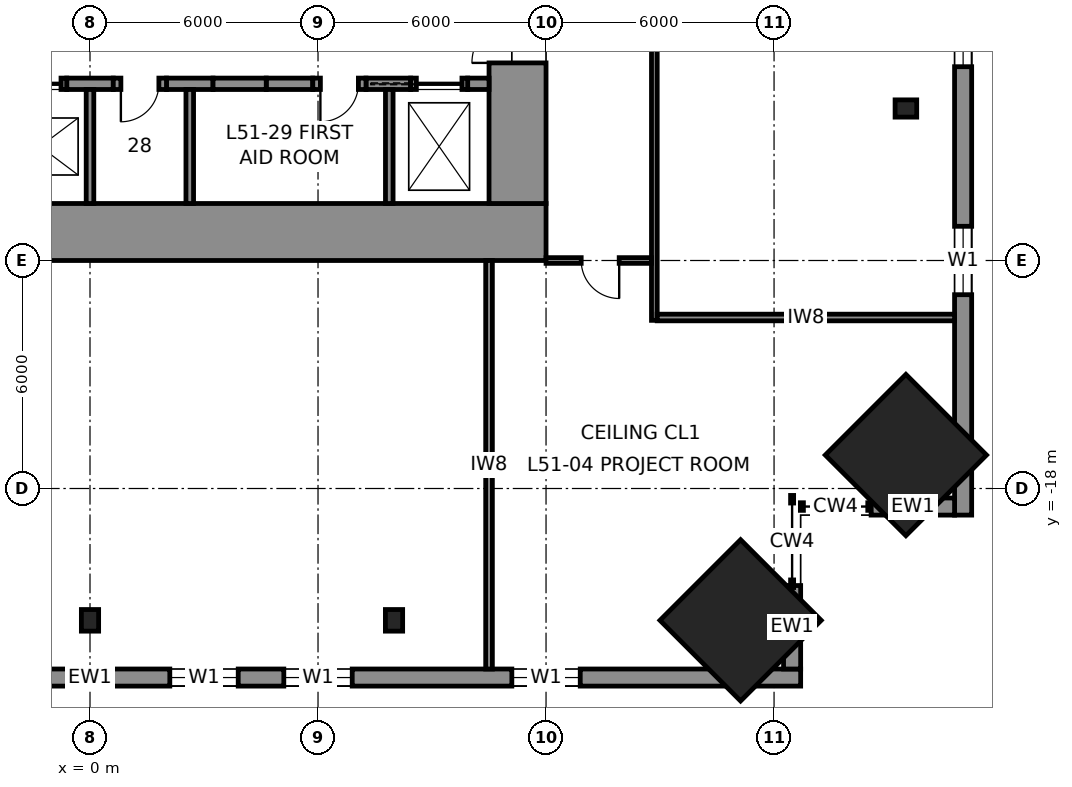
"""IFC4 building model, lengths in metres.
Left out: names, types, materials, properties, quantities, classifications, styles, units other than length and angle.
Written with IfcOpenShell. Run it as: python <this file> out.ifc"""

import sys

from ifc_helpers import new_model, si_unit, direction, frame, frame_2d, origin, origin_2d, place, context, subcontext, project, spatial, rectangle, i_section, extrude, element, fill, save


model = new_model("IFC4")
c1 = context("Model", 3, precision=1e-05, world=origin(), true_north=direction((0.0, 1.0)))
c2 = subcontext(c1, "Body", "Model", "MODEL_VIEW")
j1 = project(units=[si_unit("LENGTHUNIT", "METRE"), si_unit("PLANEANGLEUNIT", "RADIAN")], contexts=[c1])
p1 = place(None, origin())
s1 = spatial("IfcSite", under=j1, at=p1, CompositionType="ELEMENT")
p2 = place(p1, origin())
s2 = spatial("IfcBuilding", under=s1, at=p2, CompositionType="ELEMENT")
p3 = place(p2, frame((0.0, 0.0, 233.8)))
s3 = spatial("IfcBuildingStorey", under=s2, at=p3, CompositionType="ELEMENT", Elevation=233.8)
for number, where, z_axis, x_axis in (
    (1, (21.469, -17.119, 0.0), (-0.04, 0.04, 0.998), (-0.708, -0.707, 0.0)),
    (2, (17.119, -21.469, 0.0), (-0.04, 0.04, 0.998), (-0.707, -0.708, 0.0)),
):
    element("IfcColumn", number, at=place(p3, frame(where, z_axis=z_axis, x_axis=x_axis)), inside=s3, PredefinedType="COLUMN", context=c2, shape_type="SweptSolid", body=[
        extrude(rectangle(XDim=3.0, YDim=3.0, at=origin_2d()), origin(), (0.0, 0.0, 1.0), 4.007),
    ])
for number, where, z_axis, x_axis in (
    (3, (21.469, -8.0, 0.0), (-0.04, 0.0, 0.999), (0.0, -1.0, 0.0)),
    (4, (0.0, -21.469, 0.0), (0.0, 0.04, 0.999), (-1.0, 0.0, 0.0)),
    (5, (8.0, -21.469, 0.0), (0.0, 0.04, 0.999), (-1.0, 0.0, 0.0)),
):
    element("IfcColumn", number, at=place(p3, frame(where, z_axis=z_axis, x_axis=x_axis)), inside=s3, PredefinedType="COLUMN", context=c2, shape_type="SweptSolid", body=[
        extrude(i_section(OverallWidth=0.454, OverallDepth=0.569, WebThickness=0.078, FlangeThickness=0.125, at=origin_2d()), origin(), (0.0, 0.0, 1.0), 4.003),
    ])
p4 = place(p3, frame((12.0, -11.25, 0.0), z_axis=(0.0, 0.0, 1.0), x_axis=(-1.0, 0.0, 0.0)))
e6 = element("IfcWall", 6, at=p4, inside=s3, PredefinedType="SHEAR", context=c2, shape_type="SweptSolid", body=[
    extrude(rectangle(XDim=24.0, YDim=1.5, at=frame_2d((12.0, 0.0))), origin(), (0.0, 0.0, 1.0), 4.0),
])
p5 = place(p3, frame((11.25, 10.5, 0.0), z_axis=(0.0, 0.0, 1.0), x_axis=(0.0, -1.0, 0.0)))
e7 = element("IfcWall", 7, at=p5, inside=s3, PredefinedType="SHEAR", context=c2, shape_type="SweptSolid", body=[
    extrude(rectangle(XDim=21.0, YDim=1.5, at=frame_2d((10.5, 0.0))), origin(), (0.0, 0.0, 1.0), 4.0),
])
p6 = place(p5, frame((3.7, 0.0, 0.0)))
e8 = element("IfcOpeningElement", 8, at=p6, cuts=e7, PredefinedType="OPENING", context=c2, shape_type="SweptSolid", body=[
    extrude(rectangle(XDim=1.2, YDim=2.3, at=frame_2d((0.6, 1.15))), frame((0.0, 0.76, 0.0), z_axis=(0.0, -1.0, 0.0), x_axis=(1.0, 0.0, 0.0)), (0.0, 0.0, 1.0), 1.52),
])
p7 = place(p5, frame((16.1, 0.0, 0.0)))
e9 = element("IfcOpeningElement", 9, at=p7, cuts=e7, PredefinedType="OPENING", context=c2, shape_type="SweptSolid", body=[
    extrude(rectangle(XDim=1.2, YDim=2.3, at=frame_2d((0.6, 1.15))), frame((0.0, 0.76, 0.0), z_axis=(0.0, -1.0, 0.0), x_axis=(1.0, 0.0, 0.0)), (0.0, 0.0, 1.0), 1.52),
])
for number, where, z_axis, x_axis in (
    (10, (-0.613, -7.35, 0.0), (0.0, 0.0, 1.0), (1.0, 0.0, 0.0)),
    (11, (2.012, -7.35, 0.0), (0.0, 0.0, 1.0), (1.0, 0.0, 0.0)),
    (12, (4.637, -7.35, 0.0), (0.0, 0.0, 1.0), (1.0, 0.0, 0.0)),
):
    element("IfcWall", number, at=place(p3, frame(where, z_axis=z_axis, x_axis=x_axis)), inside=s3, PredefinedType="SHEAR", context=c2, shape_type="SweptSolid", body=[
        extrude(rectangle(XDim=1.225, YDim=0.3, at=frame_2d((0.613, 0.0))), origin(), (0.0, 0.0, 1.0), 4.0),
    ])
p8 = place(p3, frame((7.262, -7.35, 0.0), z_axis=(0.0, 0.0, 1.0), x_axis=(1.0, 0.0, 0.0)))
e13 = element("IfcWall", 13, at=p8, inside=s3, PredefinedType="SHEAR", context=c2, shape_type="SweptSolid", body=[
    extrude(rectangle(XDim=1.175, YDim=0.3, at=frame_2d((0.587, 0.0))), origin(), (0.0, 0.0, 1.0), 4.0),
])
p9 = place(p3, frame((9.938, -7.35, 0.0), z_axis=(0.0, 0.0, 1.0), x_axis=(1.0, 0.0, 0.0)))
e14 = element("IfcWall", 14, at=p9, inside=s3, PredefinedType="SHEAR", context=c2, shape_type="SweptSolid", body=[
    extrude(rectangle(XDim=0.562, YDim=0.3, at=frame_2d((0.281, 0.0))), origin(), (0.0, 0.0, 1.0), 4.0),
])
p10 = place(p3, frame((-2.012, -7.35, 0.0), z_axis=(0.0, 0.0, 1.0), x_axis=(1.0, 0.0, 0.0)))
e15 = element("IfcWall", 15, at=p10, inside=s3, PredefinedType="PARTITIONING", context=c2, shape_type="SweptSolid", body=[
    extrude(rectangle(XDim=1.4, YDim=0.3, at=frame_2d((0.7, 0.0))), origin(), (0.0, 0.0, 1.0), 4.0),
])
p11 = place(p10, frame((0.15, 0.0, 0.0)))
e16 = element("IfcOpeningElement", 16, at=p11, cuts=e15, PredefinedType="OPENING", context=c2, shape_type="SweptSolid", body=[
    extrude(rectangle(XDim=1.1, YDim=2.3, at=frame_2d((0.55, 1.15))), frame((0.0, 0.16, 0.0), z_axis=(0.0, -1.0, 0.0), x_axis=(1.0, 0.0, 0.0)), (0.0, 0.0, 1.0), 0.32),
])
p12 = place(p3, frame((0.613, -7.35, 0.0), z_axis=(0.0, 0.0, 1.0), x_axis=(1.0, 0.0, 0.0)))
e17 = element("IfcWall", 17, at=p12, inside=s3, PredefinedType="PARTITIONING", context=c2, shape_type="SweptSolid", body=[
    extrude(rectangle(XDim=1.4, YDim=0.3, at=frame_2d((0.7, 0.0))), origin(), (0.0, 0.0, 1.0), 4.0),
])
p13 = place(p12, frame((0.2, 0.0, 0.0)))
e18 = element("IfcOpeningElement", 18, at=p13, cuts=e17, PredefinedType="OPENING", context=c2, shape_type="SweptSolid", body=[
    extrude(rectangle(XDim=1.0, YDim=2.3, at=frame_2d((0.5, 1.15))), frame((0.0, 0.16, 0.0), z_axis=(0.0, -1.0, 0.0), x_axis=(1.0, 0.0, 0.0)), (0.0, 0.0, 1.0), 0.32),
])
p14 = place(p3, frame((3.238, -7.35, 0.0), z_axis=(0.0, 0.0, 1.0), x_axis=(1.0, 0.0, 0.0)))
e19 = element("IfcWall", 19, at=p14, inside=s3, PredefinedType="PARTITIONING", context=c2, shape_type="SweptSolid", body=[
    extrude(rectangle(XDim=1.4, YDim=0.3, at=frame_2d((0.7, 0.0))), origin(), (0.0, 0.0, 1.0), 4.0),
])
p15 = place(p3, frame((5.863, -7.35, 0.0), z_axis=(0.0, 0.0, 1.0), x_axis=(1.0, 0.0, 0.0)))
e20 = element("IfcWall", 20, at=p15, inside=s3, PredefinedType="PARTITIONING", context=c2, shape_type="SweptSolid", body=[
    extrude(rectangle(XDim=1.4, YDim=0.3, at=frame_2d((0.7, 0.0))), origin(), (0.0, 0.0, 1.0), 4.0),
])
p16 = place(p15, frame((0.2, 0.0, 0.0)))
e21 = element("IfcOpeningElement", 21, at=p16, cuts=e20, PredefinedType="OPENING", context=c2, shape_type="SweptSolid", body=[
    extrude(rectangle(XDim=1.0, YDim=2.3, at=frame_2d((0.5, 1.15))), frame((0.0, 0.16, 0.0), z_axis=(0.0, -1.0, 0.0), x_axis=(1.0, 0.0, 0.0)), (0.0, 0.0, 1.0), 0.32),
])
p17 = place(p3, frame((8.438, -7.35, 0.0), z_axis=(0.0, 0.0, 1.0), x_axis=(1.0, 0.0, 0.0)))
e22 = element("IfcWall", 22, at=p17, inside=s3, PredefinedType="PARTITIONING", context=c2, shape_type="SweptSolid", body=[
    extrude(rectangle(XDim=1.5, YDim=0.3, at=frame_2d((0.75, 0.0))), origin(), (0.0, 0.0, 1.0), 4.0),
])
p18 = place(p17, frame((0.15, 0.0, 0.0)))
e23 = element("IfcOpeningElement", 23, at=p18, cuts=e22, PredefinedType="OPENING", context=c2, shape_type="SweptSolid", body=[
    extrude(rectangle(XDim=1.2, YDim=2.3, at=frame_2d((0.6, 1.15))), frame((0.0, 0.16, 0.0), z_axis=(0.0, -1.0, 0.0), x_axis=(1.0, 0.0, 0.0)), (0.0, 0.0, 1.0), 0.32),
])
for number, where, z_axis, x_axis in (
    (24, (0.0, -10.5, 0.0), (0.0, 0.0, 1.0), (0.0, 1.0, 0.0)),
    (25, (2.625, -10.5, 0.0), (0.0, 0.0, 1.0), (0.0, 1.0, 0.0)),
    (26, (7.875, -10.5, 0.0), (0.0, 0.0, 1.0), (0.0, 1.0, 0.0)),
):
    element("IfcWall", number, at=place(p3, frame(where, z_axis=z_axis, x_axis=x_axis)), inside=s3, PredefinedType="PARTITIONING", context=c2, shape_type="SweptSolid", body=[
        extrude(rectangle(XDim=3.0, YDim=0.2, at=frame_2d((1.5, 0.0))), origin(), (0.0, 0.0, 1.0), 4.0),
    ])
p19 = place(p3, frame((22.975, -18.7, 0.0), z_axis=(0.0, 0.0, 1.0), x_axis=(0.0, 1.0, 0.0)))
e27 = element("IfcWall", 27, at=p19, inside=s3, PredefinedType="SOLIDWALL", context=c2, shape_type="SweptSolid", body=[
    extrude(rectangle(XDim=37.4, YDim=0.45, at=frame_2d((18.7, 0.0))), origin(), (0.0, 0.0, 1.0), 3.83),
])
p20 = place(p19, frame((5.8, 0.0, 0.7)))
e28 = element("IfcOpeningElement", 28, at=p20, cuts=e27, PredefinedType="OPENING", context=c2, shape_type="SweptSolid", body=[
    extrude(rectangle(XDim=1.8, YDim=2.6, at=frame_2d((0.9, 1.3))), frame((0.0, 0.235, 0.0), z_axis=(0.0, -1.0, 0.0), x_axis=(1.0, 0.0, 0.0)), (0.0, 0.0, 1.0), 0.47),
])
p21 = place(p19, frame((11.8, 0.0, 0.7)))
e29 = element("IfcOpeningElement", 29, at=p21, cuts=e27, PredefinedType="OPENING", context=c2, shape_type="SweptSolid", body=[
    extrude(rectangle(XDim=1.8, YDim=2.6, at=frame_2d((0.9, 1.3))), frame((0.0, 0.235, 0.0), z_axis=(0.0, -1.0, 0.0), x_axis=(1.0, 0.0, 0.0)), (0.0, 0.0, 1.0), 0.47),
])
p22 = place(p19, frame((14.8, 0.0, 0.7)))
e30 = element("IfcOpeningElement", 30, at=p22, cuts=e27, PredefinedType="OPENING", context=c2, shape_type="SweptSolid", body=[
    extrude(rectangle(XDim=1.8, YDim=2.6, at=frame_2d((0.9, 1.3))), frame((0.0, 0.235, 0.0), z_axis=(0.0, -1.0, 0.0), x_axis=(1.0, 0.0, 0.0)), (0.0, 0.0, 1.0), 0.47),
])
p23 = place(p19, frame((20.8, 0.0, 0.7)))
e31 = element("IfcOpeningElement", 31, at=p23, cuts=e27, PredefinedType="OPENING", context=c2, shape_type="SweptSolid", body=[
    extrude(rectangle(XDim=1.8, YDim=2.6, at=frame_2d((0.9, 1.3))), frame((0.0, 0.235, 0.0), z_axis=(0.0, -1.0, 0.0), x_axis=(1.0, 0.0, 0.0)), (0.0, 0.0, 1.0), 0.47),
])
p24 = place(p19, frame((23.8, 0.0, 0.7)))
e32 = element("IfcOpeningElement", 32, at=p24, cuts=e27, PredefinedType="OPENING", context=c2, shape_type="SweptSolid", body=[
    extrude(rectangle(XDim=1.8, YDim=2.6, at=frame_2d((0.9, 1.3))), frame((0.0, 0.235, 0.0), z_axis=(0.0, -1.0, 0.0), x_axis=(1.0, 0.0, 0.0)), (0.0, 0.0, 1.0), 0.47),
])
p25 = place(p19, frame((29.8, 0.0, 0.7)))
e33 = element("IfcOpeningElement", 33, at=p25, cuts=e27, PredefinedType="OPENING", context=c2, shape_type="SweptSolid", body=[
    extrude(rectangle(XDim=1.8, YDim=2.6, at=frame_2d((0.9, 1.3))), frame((0.0, 0.235, 0.0), z_axis=(0.0, -1.0, 0.0), x_axis=(1.0, 0.0, 0.0)), (0.0, 0.0, 1.0), 0.47),
])
p26 = place(p3, frame((-18.7, -22.975, 0.0), z_axis=(0.0, 0.0, 1.0), x_axis=(1.0, 0.0, 0.0)))
e34 = element("IfcWall", 34, at=p26, inside=s3, PredefinedType="SOLIDWALL", context=c2, shape_type="SweptSolid", body=[
    extrude(rectangle(XDim=37.4, YDim=0.45, at=frame_2d((18.7, 0.0))), origin(), (0.0, 0.0, 1.0), 3.83),
])
p27 = place(p26, frame((5.8, 0.0, 0.7)))
e35 = element("IfcOpeningElement", 35, at=p27, cuts=e34, PredefinedType="OPENING", context=c2, shape_type="SweptSolid", body=[
    extrude(rectangle(XDim=1.8, YDim=2.6, at=frame_2d((0.9, 1.3))), frame((0.0, 0.235, 0.0), z_axis=(0.0, -1.0, 0.0), x_axis=(1.0, 0.0, 0.0)), (0.0, 0.0, 1.0), 0.47),
])
p28 = place(p26, frame((11.8, 0.0, 0.7)))
e36 = element("IfcOpeningElement", 36, at=p28, cuts=e34, PredefinedType="OPENING", context=c2, shape_type="SweptSolid", body=[
    extrude(rectangle(XDim=1.8, YDim=2.6, at=frame_2d((0.9, 1.3))), frame((0.0, 0.235, 0.0), z_axis=(0.0, -1.0, 0.0), x_axis=(1.0, 0.0, 0.0)), (0.0, 0.0, 1.0), 0.47),
])
p29 = place(p26, frame((14.8, 0.0, 0.7)))
e37 = element("IfcOpeningElement", 37, at=p29, cuts=e34, PredefinedType="OPENING", context=c2, shape_type="SweptSolid", body=[
    extrude(rectangle(XDim=1.8, YDim=2.6, at=frame_2d((0.9, 1.3))), frame((0.0, 0.235, 0.0), z_axis=(0.0, -1.0, 0.0), x_axis=(1.0, 0.0, 0.0)), (0.0, 0.0, 1.0), 0.47),
])
p30 = place(p26, frame((20.8, 0.0, 0.7)))
e38 = element("IfcOpeningElement", 38, at=p30, cuts=e34, PredefinedType="OPENING", context=c2, shape_type="SweptSolid", body=[
    extrude(rectangle(XDim=1.8, YDim=2.6, at=frame_2d((0.9, 1.3))), frame((0.0, 0.235, 0.0), z_axis=(0.0, -1.0, 0.0), x_axis=(1.0, 0.0, 0.0)), (0.0, 0.0, 1.0), 0.47),
])
p31 = place(p26, frame((23.8, 0.0, 0.7)))
e39 = element("IfcOpeningElement", 39, at=p31, cuts=e34, PredefinedType="OPENING", context=c2, shape_type="SweptSolid", body=[
    extrude(rectangle(XDim=1.8, YDim=2.6, at=frame_2d((0.9, 1.3))), frame((0.0, 0.235, 0.0), z_axis=(0.0, -1.0, 0.0), x_axis=(1.0, 0.0, 0.0)), (0.0, 0.0, 1.0), 0.47),
])
p32 = place(p26, frame((29.8, 0.0, 0.7)))
e40 = element("IfcOpeningElement", 40, at=p32, cuts=e34, PredefinedType="OPENING", context=c2, shape_type="SweptSolid", body=[
    extrude(rectangle(XDim=1.8, YDim=2.6, at=frame_2d((0.9, 1.3))), frame((0.0, 0.235, 0.0), z_axis=(0.0, -1.0, 0.0), x_axis=(1.0, 0.0, 0.0)), (0.0, 0.0, 1.0), 0.47),
])
for number, where, z_axis, x_axis in (
    (41, (18.475, -20.554, 0.0), (0.0, 0.0, 1.0), (0.0, -1.0, 0.0)),
    (42, (20.554, -18.475, 0.0), (0.0, 0.0, 1.0), (1.0, 0.0, 0.0)),
):
    element("IfcWall", number, at=place(p3, frame(where, z_axis=z_axis, x_axis=x_axis)), inside=s3, PredefinedType="SOLIDWALL", context=c2, shape_type="SweptSolid", body=[
        extrude(rectangle(XDim=2.196, YDim=0.45, at=frame_2d((1.098, 0.0))), origin(), (0.0, 0.0, 1.0), 3.83),
    ])
p33 = place(p3, frame((14.85, -13.575, 0.0), z_axis=(0.0, 0.0, 1.0), x_axis=(0.0, 1.0, 0.0)))
e43 = element("IfcWall", 43, at=p33, inside=s3, PredefinedType="PARTITIONING", context=c2, shape_type="SweptSolid", body=[
    extrude(rectangle(XDim=27.15, YDim=0.15, at=frame_2d((13.575, 0.0))), origin(), (0.0, 0.0, 1.0), 3.83),
])
p34 = place(p33, frame((21.125, 0.0, 0.0)))
e44 = element("IfcOpeningElement", 44, at=p34, cuts=e43, PredefinedType="OPENING", context=c2, shape_type="SweptSolid", body=[
    extrude(rectangle(XDim=1.6, YDim=2.3, at=frame_2d((0.8, 1.15))), frame((0.0, 0.085, 0.0), z_axis=(0.0, -1.0, 0.0), x_axis=(1.0, 0.0, 0.0)), (0.0, 0.0, 1.0), 0.17),
])
p35 = place(p33, frame((9.325, 0.0, 0.0)))
e45 = element("IfcOpeningElement", 45, at=p35, cuts=e43, PredefinedType="OPENING", context=c2, shape_type="SweptSolid", body=[
    extrude(rectangle(XDim=1.0, YDim=2.3, at=frame_2d((0.5, 1.15))), frame((0.0, 0.085, 0.0), z_axis=(0.0, -1.0, 0.0), x_axis=(1.0, 0.0, 0.0)), (0.0, 0.0, 1.0), 0.17),
])
p36 = place(p33, frame((16.575, 0.0, 0.0)))
e46 = element("IfcOpeningElement", 46, at=p36, cuts=e43, PredefinedType="OPENING", context=c2, shape_type="SweptSolid", body=[
    extrude(rectangle(XDim=1.0, YDim=2.3, at=frame_2d((0.5, 1.15))), frame((0.0, 0.085, 0.0), z_axis=(0.0, -1.0, 0.0), x_axis=(1.0, 0.0, 0.0)), (0.0, 0.0, 1.0), 0.17),
])
p37 = place(p3, frame((14.775, -12.0, 0.0), z_axis=(0.0, 0.0, 1.0), x_axis=(-1.0, 0.0, 0.0)))
e47 = element("IfcWall", 47, at=p37, inside=s3, PredefinedType="PARTITIONING", context=c2, shape_type="SweptSolid", body=[
    extrude(rectangle(XDim=2.775, YDim=0.15, at=frame_2d((1.387, 0.0))), origin(), (0.0, 0.0, 1.0), 3.83),
])
p38 = place(p37, frame((0.85, 0.0, 0.0)))
e48 = element("IfcOpeningElement", 48, at=p38, cuts=e47, PredefinedType="OPENING", context=c2, shape_type="SweptSolid", body=[
    extrude(rectangle(XDim=1.0, YDim=2.3, at=frame_2d((0.5, 1.15))), frame((0.0, 0.085, 0.0), z_axis=(0.0, -1.0, 0.0), x_axis=(1.0, 0.0, 0.0)), (0.0, 0.0, 1.0), 0.17),
])
p39 = place(p3, frame((22.75, -13.5, 0.0), z_axis=(0.0, 0.0, 1.0), x_axis=(-1.0, 0.0, 0.0)))
e49 = element("IfcWall", 49, at=p39, inside=s3, PredefinedType="PARTITIONING", context=c2, shape_type="SweptSolid", body=[
    extrude(rectangle(XDim=7.825, YDim=0.175, at=frame_2d((3.913, 0.0))), origin(), (0.0, 0.0, 1.0), 3.83),
])
p40 = place(p3, frame((10.5, -12.0, 0.0), z_axis=(0.0, 0.0, 1.0), x_axis=(0.0, -1.0, 0.0)))
e50 = element("IfcWall", 50, at=p40, inside=s3, PredefinedType="PARTITIONING", context=c2, shape_type="SweptSolid", body=[
    extrude(rectangle(XDim=10.75, YDim=0.175, at=frame_2d((5.375, 0.0))), origin(), (0.0, 0.0, 1.0), 3.83),
])
p41 = place(p20, origin())
e51 = element("IfcWindow", 51, at=p41, inside=s3, PartitioningType="SINGLE_PANEL", PredefinedType="WINDOW", context=c2, shape_type="SweptSolid", body=[
    extrude(rectangle(XDim=1.8, YDim=2.6, at=frame_2d((0.9, 1.3))), frame((0.0, 0.03, 0.0), z_axis=(0.0, -1.0, 0.0), x_axis=(1.0, 0.0, 0.0)), (0.0, 0.0, 1.0), 0.06),
])
fill(e28, e51)
p42 = place(p21, origin())
e52 = element("IfcWindow", 52, at=p42, inside=s3, PartitioningType="SINGLE_PANEL", PredefinedType="WINDOW", context=c2, shape_type="SweptSolid", body=[
    extrude(rectangle(XDim=1.8, YDim=2.6, at=frame_2d((0.9, 1.3))), frame((0.0, 0.03, 0.0), z_axis=(0.0, -1.0, 0.0), x_axis=(1.0, 0.0, 0.0)), (0.0, 0.0, 1.0), 0.06),
])
fill(e29, e52)
p43 = place(p30, origin())
e53 = element("IfcWindow", 53, at=p43, inside=s3, PartitioningType="SINGLE_PANEL", PredefinedType="WINDOW", context=c2, shape_type="SweptSolid", body=[
    extrude(rectangle(XDim=1.8, YDim=2.6, at=frame_2d((0.9, 1.3))), frame((0.0, 0.03, 0.0), z_axis=(0.0, -1.0, 0.0), x_axis=(1.0, 0.0, 0.0)), (0.0, 0.0, 1.0), 0.06),
])
fill(e38, e53)
p44 = place(p31, origin())
e54 = element("IfcWindow", 54, at=p44, inside=s3, PartitioningType="SINGLE_PANEL", PredefinedType="WINDOW", context=c2, shape_type="SweptSolid", body=[
    extrude(rectangle(XDim=1.8, YDim=2.6, at=frame_2d((0.9, 1.3))), frame((0.0, 0.03, 0.0), z_axis=(0.0, -1.0, 0.0), x_axis=(1.0, 0.0, 0.0)), (0.0, 0.0, 1.0), 0.06),
])
fill(e39, e54)
p45 = place(p32, origin())
e55 = element("IfcWindow", 55, at=p45, inside=s3, PartitioningType="SINGLE_PANEL", PredefinedType="WINDOW", context=c2, shape_type="SweptSolid", body=[
    extrude(rectangle(XDim=1.8, YDim=2.6, at=frame_2d((0.9, 1.3))), frame((0.0, 0.03, 0.0), z_axis=(0.0, -1.0, 0.0), x_axis=(1.0, 0.0, 0.0)), (0.0, 0.0, 1.0), 0.06),
])
fill(e40, e55)
p46 = place(p38, origin())
e56 = element("IfcDoor", 56, at=p46, inside=s3, OperationType="SINGLE_SWING_LEFT", PredefinedType="DOOR", context=c2, shape_type="SweptSolid", body=[
    extrude(rectangle(XDim=1.0, YDim=2.3, at=frame_2d((0.5, 1.15))), frame((0.0, 0.025, 0.0), z_axis=(0.0, -1.0, 0.0), x_axis=(1.0, 0.0, 0.0)), (0.0, 0.0, 1.0), 0.05),
])
fill(e48, e56)
p47 = place(p13, frame((1.0, 0.0, 0.0), z_axis=(0.0, 0.0, 1.0), x_axis=(-1.0, 0.0, 0.0)))
e57 = element("IfcDoor", 57, at=p47, inside=s3, OperationType="SINGLE_SWING_RIGHT", PredefinedType="DOOR", context=c2, shape_type="SweptSolid", body=[
    extrude(rectangle(XDim=1.0, YDim=2.3, at=frame_2d((0.5, 1.15))), frame((0.0, 0.025, 0.0), z_axis=(0.0, -1.0, 0.0), x_axis=(1.0, 0.0, 0.0)), (0.0, 0.0, 1.0), 0.05),
])
fill(e18, e57)
p48 = place(p16, frame((1.0, 0.0, 0.0), z_axis=(0.0, 0.0, 1.0), x_axis=(-1.0, 0.0, 0.0)))
e58 = element("IfcDoor", 58, at=p48, inside=s3, OperationType="SINGLE_SWING_RIGHT", PredefinedType="DOOR", context=c2, shape_type="SweptSolid", body=[
    extrude(rectangle(XDim=1.0, YDim=2.3, at=frame_2d((0.5, 1.15))), frame((0.0, 0.025, 0.0), z_axis=(0.0, -1.0, 0.0), x_axis=(1.0, 0.0, 0.0)), (0.0, 0.0, 1.0), 0.05),
])
fill(e21, e58)
p49 = place(p7, frame((1.2, 0.0, 0.0), z_axis=(0.0, 0.0, 1.0), x_axis=(-1.0, 0.0, 0.0)))
e59 = element("IfcDoor", 59, at=p49, inside=s3, OperationType="SINGLE_SWING_LEFT", PredefinedType="DOOR", context=c2, shape_type="SweptSolid", body=[
    extrude(rectangle(XDim=1.2, YDim=2.3, at=frame_2d((0.6, 1.15))), frame((0.0, 0.025, 0.0), z_axis=(0.0, -1.0, 0.0), x_axis=(1.0, 0.0, 0.0)), (0.0, 0.0, 1.0), 0.05),
])
fill(e9, e59)
p50 = place(p18, origin())
e60 = element("IfcDoor", 60, at=p50, inside=s3, OperationType="SLIDING_TO_LEFT", PredefinedType="DOOR", context=c2, shape_type="SweptSolid", body=[
    extrude(rectangle(XDim=1.2, YDim=2.3, at=frame_2d((0.6, 1.15))), frame((0.0, 0.025, 0.0), z_axis=(0.0, -1.0, 0.0), x_axis=(1.0, 0.0, 0.0)), (0.0, 0.0, 1.0), 0.05),
])
fill(e23, e60)
p51 = place(p11, origin())
e61 = element("IfcDoor", 61, at=p51, inside=s3, OperationType="SLIDING_TO_LEFT", PredefinedType="DOOR", context=c2, shape_type="SweptSolid", body=[
    extrude(rectangle(XDim=1.1, YDim=2.3, at=frame_2d((0.55, 1.15))), frame((0.0, 0.025, 0.0), z_axis=(0.0, -1.0, 0.0), x_axis=(1.0, 0.0, 0.0)), (0.0, 0.0, 1.0), 0.05),
])
fill(e16, e61)
save(model, sys.argv[1])
